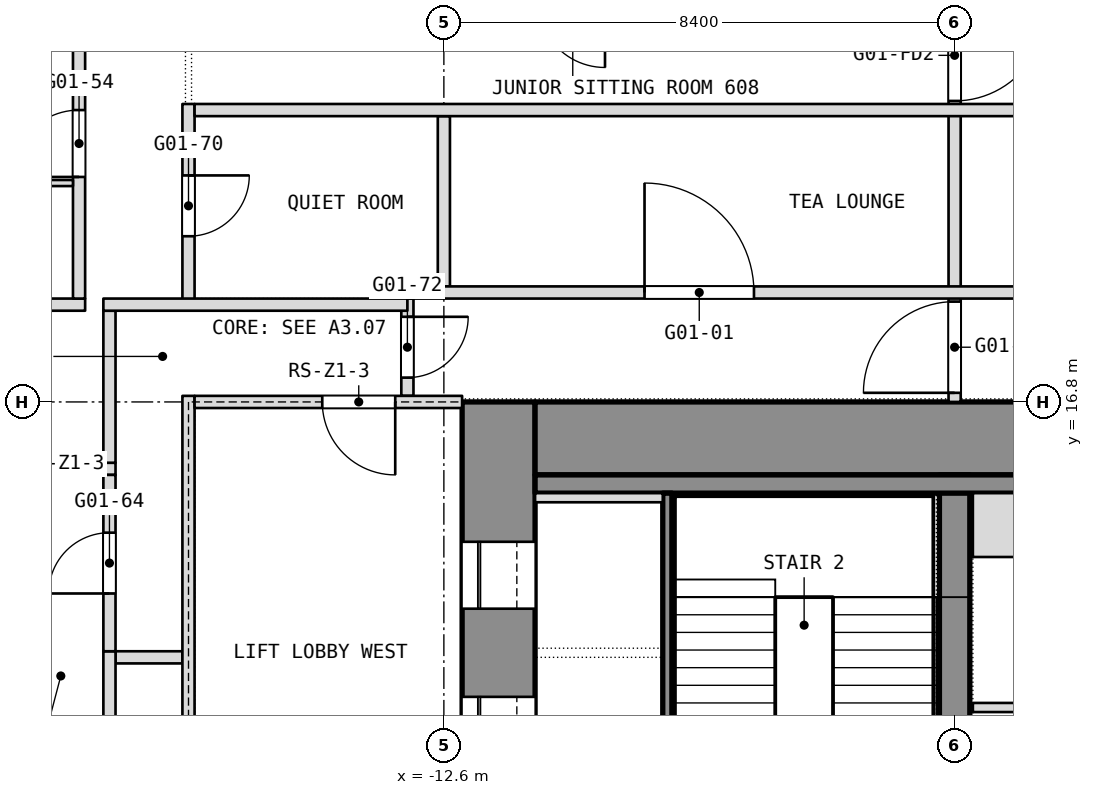
"""IFC4 building model, lengths in metres.
Left out: names, types, materials, properties, quantities, classifications, styles, units other than length and angle.
Written with IfcOpenShell. Run it as: python <this file> out.ifc"""

import sys

from ifc_helpers import new_model, si_unit, direction, frame, frame_2d, origin, place, context, subcontext, project, spatial, rectangle, extrude, element, fill, save


model = new_model("IFC4")
c1 = context("Model", 3, precision=1e-05, world=origin(), true_north=direction((0.0, 1.0)))
c2 = subcontext(c1, "Body", "Model", "MODEL_VIEW")
j1 = project(units=[si_unit("LENGTHUNIT", "METRE"), si_unit("PLANEANGLEUNIT", "RADIAN")], contexts=[c1])
p1 = place(None, origin())
s1 = spatial("IfcSite", under=j1, at=p1, CompositionType="ELEMENT")
p2 = place(p1, origin())
s2 = spatial("IfcBuilding", under=s1, at=p2, CompositionType="ELEMENT")
p3 = place(p2, frame((0.0, 0.0, 36.5)))
s3 = spatial("IfcBuildingStorey", under=s2, at=p3, CompositionType="ELEMENT", Elevation=36.5)
p4 = place(p3, frame((-11.7, 0.0, 0.0), z_axis=(0.0, 0.0, 1.0), x_axis=(0.0, 1.0, 0.0)))
e1 = element("IfcWall", 1, at=p4, inside=s3, PredefinedType="SHEAR", context=c2, shape_type="SweptSolid", body=[
    extrude(rectangle(XDim=16.8, YDim=1.2, at=frame_2d((8.4, 0.0))), origin(), (0.0, 0.0, 1.0), 3.6),
])
p5 = place(p4, frame((2.3, 0.0, 0.0)))
e2 = element("IfcOpeningElement", 2, at=p5, cuts=e1, PredefinedType="OPENING", context=c2, shape_type="SweptSolid", body=[
    extrude(rectangle(XDim=1.1, YDim=2.1, at=frame_2d((0.55, 1.05))), frame((0.0, 0.6, 0.0), z_axis=(0.0, -1.0, 0.0), x_axis=(1.0, 0.0, 0.0)), (0.0, 0.0, 1.0), 1.2),
])
p6 = place(p4, frame((4.85, 0.0, 0.0)))
e3 = element("IfcOpeningElement", 3, at=p6, cuts=e1, PredefinedType="OPENING", context=c2, shape_type="SweptSolid", body=[
    extrude(rectangle(XDim=1.1, YDim=2.1, at=frame_2d((0.55, 1.05))), frame((0.0, 0.6, 0.0), z_axis=(0.0, -1.0, 0.0), x_axis=(1.0, 0.0, 0.0)), (0.0, 0.0, 1.0), 1.2),
])
p7 = place(p4, frame((6.825, 0.0, 0.0)))
e4 = element("IfcOpeningElement", 4, at=p7, cuts=e1, PredefinedType="OPENING", context=c2, shape_type="SweptSolid", body=[
    extrude(rectangle(XDim=1.2, YDim=2.1, at=frame_2d((0.6, 1.05))), frame((0.0, 0.6, 0.0), z_axis=(0.0, -1.0, 0.0), x_axis=(1.0, 0.0, 0.0)), (0.0, 0.0, 1.0), 1.2),
])
p8 = place(p4, frame((13.4, 0.0, 0.0)))
e5 = element("IfcOpeningElement", 5, at=p8, cuts=e1, PredefinedType="OPENING", context=c2, shape_type="SweptSolid", body=[
    extrude(rectangle(XDim=1.1, YDim=2.1, at=frame_2d((0.55, 1.05))), frame((0.0, 0.6, 0.0), z_axis=(0.0, -1.0, 0.0), x_axis=(1.0, 0.0, 0.0)), (0.0, 0.0, 1.0), 1.2),
])
p9 = place(p4, frame((10.85, 0.0, 0.0)))
e6 = element("IfcOpeningElement", 6, at=p9, cuts=e1, PredefinedType="OPENING", context=c2, shape_type="SweptSolid", body=[
    extrude(rectangle(XDim=1.1, YDim=2.1, at=frame_2d((0.55, 1.05))), frame((0.0, 0.6, 0.0), z_axis=(0.0, -1.0, 0.0), x_axis=(1.0, 0.0, 0.0)), (0.0, 0.0, 1.0), 1.2),
])
p10 = place(p4, frame((8.775, 0.0, 0.0)))
e7 = element("IfcOpeningElement", 7, at=p10, cuts=e1, PredefinedType="OPENING", context=c2, shape_type="SweptSolid", body=[
    extrude(rectangle(XDim=1.2, YDim=2.1, at=frame_2d((0.6, 1.05))), frame((0.0, 0.6, 0.0), z_axis=(0.0, -1.0, 0.0), x_axis=(1.0, 0.0, 0.0)), (0.0, 0.0, 1.0), 1.2),
])
p11 = place(p3, frame((-11.1, 16.2, 0.0), z_axis=(0.0, 0.0, 1.0), x_axis=(1.0, 0.0, 0.0)))
e8 = element("IfcWall", 8, at=p11, inside=s3, PredefinedType="SHEAR", context=c2, shape_type="SweptSolid", body=[
    extrude(rectangle(XDim=22.2, YDim=1.2, at=frame_2d((11.1, 0.0))), origin(), (0.0, 0.0, 1.0), 3.6),
])
p12 = place(p3, frame((-4.2, 1.2, 0.0), z_axis=(0.0, 0.0, 1.0), x_axis=(0.0, 1.0, 0.0)))
e9 = element("IfcWall", 9, at=p12, inside=s3, PredefinedType="SHEAR", context=c2, shape_type="SweptSolid", body=[
    extrude(rectangle(XDim=14.4, YDim=0.5, at=frame_2d((7.2, 0.0))), origin(), (0.0, 0.0, 1.0), 3.6),
])
p13 = place(p12, frame((8.1, 0.0, 0.0)))
e10 = element("IfcOpeningElement", 10, at=p13, cuts=e9, PredefinedType="OPENING", context=c2, shape_type="SweptSolid", body=[
    extrude(rectangle(XDim=1.2, YDim=2.1, at=frame_2d((0.6, 1.05))), frame((0.0, 0.25, 0.0), z_axis=(0.0, -1.0, 0.0), x_axis=(1.0, 0.0, 0.0)), (0.0, 0.0, 1.0), 0.5),
])
p14 = place(p3, frame((-4.2, 16.8, 0.0), z_axis=(0.0, 0.0, 1.0), x_axis=(0.0, 1.0, 0.0)))
e11 = element("IfcWall", 11, at=p14, inside=s3, PredefinedType="PARTITIONING", context=c2, shape_type="SweptSolid", body=[
    extrude(rectangle(XDim=6.7, YDim=0.2, at=frame_2d((3.35, 0.0))), origin(), (0.0, 0.0, 1.0), 3.34),
])
p15 = place(p14, frame((0.15, 0.0, 0.0)))
e12 = element("IfcOpeningElement", 12, at=p15, cuts=e11, PredefinedType="OPENING", context=c2, shape_type="SweptSolid", body=[
    extrude(rectangle(XDim=1.5, YDim=2.1, at=frame_2d((0.75, 1.05))), frame((0.0, 0.1, 0.0), z_axis=(0.0, -1.0, 0.0), x_axis=(1.0, 0.0, 0.0)), (0.0, 0.0, 1.0), 0.2),
])
p16 = place(p14, frame((4.95, 0.0, 0.0)))
e13 = element("IfcOpeningElement", 13, at=p16, cuts=e11, PredefinedType="OPENING", context=c2, shape_type="SweptSolid", body=[
    extrude(rectangle(XDim=1.5, YDim=2.1, at=frame_2d((0.75, 1.05))), frame((0.0, 0.1, 0.0), z_axis=(0.0, -1.0, 0.0), x_axis=(1.0, 0.0, 0.0)), (0.0, 0.0, 1.0), 0.2),
])
p17 = place(p3, frame((-12.6, 18.7, 0.0), z_axis=(0.0, 0.0, 1.0), x_axis=(0.0, 1.0, 0.0)))
e14 = element("IfcWall", 14, at=p17, inside=s3, PredefinedType="PARTITIONING", context=c2, shape_type="SweptSolid", body=[
    extrude(rectangle(XDim=2.8, YDim=0.2, at=frame_2d((1.4, 0.0))), origin(), (0.0, 0.0, 1.0), 3.34),
])
p18 = place(p3, frame((-18.0, 12.6, 0.0), z_axis=(0.0, 0.0, 1.0), x_axis=(1.0, 0.0, 0.0)))
e15 = element("IfcWall", 15, at=p18, inside=s3, PredefinedType="PARTITIONING", context=c2, shape_type="SweptSolid", body=[
    extrude(rectangle(XDim=1.1, YDim=0.2, at=frame_2d((0.55, 0.0))), origin(), (0.0, 0.0, 1.0), 3.34),
])
p19 = place(p3, frame((-13.2, 16.9, 0.0), z_axis=(0.0, 0.0, 1.0), x_axis=(0.0, 1.0, 0.0)))
e16 = element("IfcWall", 16, at=p19, inside=s3, PredefinedType="PARTITIONING", context=c2, shape_type="SweptSolid", body=[
    extrude(rectangle(XDim=1.6, YDim=0.2, at=frame_2d((0.8, 0.0))), origin(), (0.0, 0.0, 1.0), 3.34),
])
p20 = place(p19, frame((0.3, 0.0, 0.0)))
e17 = element("IfcOpeningElement", 17, at=p20, cuts=e16, PredefinedType="OPENING", context=c2, shape_type="SweptSolid", body=[
    extrude(rectangle(XDim=1.0, YDim=2.1, at=frame_2d((0.5, 1.05))), frame((0.0, 0.1, 0.0), z_axis=(0.0, -1.0, 0.0), x_axis=(1.0, 0.0, 0.0)), (0.0, 0.0, 1.0), 0.2),
])
p21 = place(p3, frame((-19.7, 15.7, 0.0), z_axis=(0.0, 0.0, 1.0), x_axis=(1.0, 0.0, 0.0)))
e18 = element("IfcWall", 18, at=p21, inside=s3, PredefinedType="PARTITIONING", context=c2, shape_type="SweptSolid", body=[
    extrude(rectangle(XDim=1.7, YDim=0.2, at=frame_2d((0.85, 0.0))), origin(), (0.0, 0.0, 1.0), 3.34),
])
p22 = place(p3, frame((-16.8, 18.35, 0.0), z_axis=(0.0, 0.0, 1.0), x_axis=(0.0, 1.0, 0.0)))
e19 = element("IfcWall", 19, at=p22, inside=s3, PredefinedType="PARTITIONING", context=c2, shape_type="SweptSolid", body=[
    extrude(rectangle(XDim=3.35, YDim=0.2, at=frame_2d((1.675, 0.0))), origin(), (0.0, 0.0, 1.0), 3.34),
])
p23 = place(p22, frame((1.175, 0.0, 0.0)))
e20 = element("IfcOpeningElement", 20, at=p23, cuts=e19, PredefinedType="OPENING", context=c2, shape_type="SweptSolid", body=[
    extrude(rectangle(XDim=1.0, YDim=2.1, at=frame_2d((0.5, 1.05))), frame((0.0, 0.1, 0.0), z_axis=(0.0, -1.0, 0.0), x_axis=(1.0, 0.0, 0.0)), (0.0, 0.0, 1.0), 0.2),
])
p24 = place(p3, frame((-18.1, 9.6, 0.0), z_axis=(0.0, 0.0, 1.0), x_axis=(0.0, 1.0, 0.0)))
e21 = element("IfcWall", 21, at=p24, inside=s3, PredefinedType="PARTITIONING", context=c2, shape_type="SweptSolid", body=[
    extrude(rectangle(XDim=3.1, YDim=0.2, at=frame_2d((1.55, 0.0))), origin(), (0.0, 0.0, 1.0), 3.34),
])
p25 = place(p3, frame((-18.1, 15.8, 0.0), z_axis=(0.0, 0.0, 1.0), x_axis=(0.0, 1.0, 0.0)))
e22 = element("IfcWall", 22, at=p25, inside=s3, PredefinedType="PARTITIONING", context=c2, shape_type="SweptSolid", body=[
    extrude(rectangle(XDim=2.5, YDim=0.2, at=frame_2d((1.25, 0.0))), origin(), (0.0, 0.0, 1.0), 3.34),
])
p26 = place(p3, frame((-18.1, 12.7, 0.0), z_axis=(0.0, 0.0, 1.0), x_axis=(0.0, 1.0, 0.0)))
e23 = element("IfcWall", 23, at=p26, inside=s3, PredefinedType="PARTITIONING", context=c2, shape_type="SweptSolid", body=[
    extrude(rectangle(XDim=2.9, YDim=0.2, at=frame_2d((1.45, 0.0))), origin(), (0.0, 0.0, 1.0), 3.34),
])
p27 = place(p26, frame((0.95, 0.0, 0.0)))
e24 = element("IfcOpeningElement", 24, at=p27, cuts=e23, PredefinedType="OPENING", context=c2, shape_type="SweptSolid", body=[
    extrude(rectangle(XDim=1.0, YDim=2.1, at=frame_2d((0.5, 1.05))), frame((0.0, 0.1, 0.0), z_axis=(0.0, -1.0, 0.0), x_axis=(1.0, 0.0, 0.0)), (0.0, 0.0, 1.0), 0.2),
])
p28 = place(p3, frame((-24.5, 18.4, 0.0), z_axis=(0.0, 0.0, 1.0), x_axis=(1.0, 0.0, 0.0)))
e25 = element("IfcWall", 25, at=p28, inside=s3, PredefinedType="PARTITIONING", context=c2, shape_type="SweptSolid", body=[
    extrude(rectangle(XDim=6.0, YDim=0.2, at=frame_2d((3.0, 0.0))), origin(), (0.0, 0.0, 1.0), 3.34),
])
p29 = place(p3, frame((-18.2, 18.4, 0.0), z_axis=(0.0, 0.0, 1.0), x_axis=(1.0, 0.0, 0.0)))
e26 = element("IfcWall", 26, at=p29, inside=s3, PredefinedType="PARTITIONING", context=c2, shape_type="SweptSolid", body=[
    extrude(rectangle(XDim=5.0, YDim=0.2, at=frame_2d((2.5, 0.0))), origin(), (0.0, 0.0, 1.0), 3.34),
])
p30 = place(p3, frame((-18.6, 18.5, 0.0), z_axis=(0.0, 0.0, 1.0), x_axis=(0.0, 1.0, 0.0)))
e27 = element("IfcWall", 27, at=p30, inside=s3, PredefinedType="PARTITIONING", context=c2, shape_type="SweptSolid", body=[
    extrude(rectangle(XDim=15.04, YDim=0.2, at=frame_2d((7.52, 0.0))), origin(), (0.0, 0.0, 1.0), 3.34),
])
p31 = place(p30, frame((2.0, 0.0, 0.0)))
e28 = element("IfcOpeningElement", 28, at=p31, cuts=e27, PredefinedType="OPENING", context=c2, shape_type="SweptSolid", body=[
    extrude(rectangle(XDim=1.1, YDim=2.1, at=frame_2d((0.55, 1.05))), frame((0.0, 0.1, 0.0), z_axis=(0.0, -1.0, 0.0), x_axis=(1.0, 0.0, 0.0)), (0.0, 0.0, 1.0), 0.2),
])
p32 = place(p30, frame((8.25, 0.0, 0.0)))
e29 = element("IfcOpeningElement", 29, at=p32, cuts=e27, PredefinedType="OPENING", context=c2, shape_type="SweptSolid", body=[
    extrude(rectangle(XDim=1.1, YDim=2.1, at=frame_2d((0.55, 1.05))), frame((0.0, 0.1, 0.0), z_axis=(0.0, -1.0, 0.0), x_axis=(1.0, 0.0, 0.0)), (0.0, 0.0, 1.0), 0.2),
])
p33 = place(p3, frame((-13.2, 18.6, 0.0), z_axis=(0.0, 0.0, 1.0), x_axis=(1.0, 0.0, 0.0)))
e30 = element("IfcWall", 30, at=p33, inside=s3, PredefinedType="PARTITIONING", context=c2, shape_type="SweptSolid", body=[
    extrude(rectangle(XDim=19.8, YDim=0.2, at=frame_2d((9.9, 0.0))), origin(), (0.0, 0.0, 1.0), 3.34),
])
p34 = place(p33, frame((3.9, 0.0, 0.0)))
e31 = element("IfcOpeningElement", 31, at=p34, cuts=e30, PredefinedType="OPENING", context=c2, shape_type="SweptSolid", body=[
    extrude(rectangle(XDim=1.8, YDim=2.1, at=frame_2d((0.9, 1.05))), frame((0.0, 0.1, 0.0), z_axis=(0.0, -1.0, 0.0), x_axis=(1.0, 0.0, 0.0)), (0.0, 0.0, 1.0), 0.2),
])
p35 = place(p33, frame((12.3, 0.0, 0.0)))
e32 = element("IfcOpeningElement", 32, at=p35, cuts=e30, PredefinedType="OPENING", context=c2, shape_type="SweptSolid", body=[
    extrude(rectangle(XDim=1.8, YDim=2.1, at=frame_2d((0.9, 1.05))), frame((0.0, 0.1, 0.0), z_axis=(0.0, -1.0, 0.0), x_axis=(1.0, 0.0, 0.0)), (0.0, 0.0, 1.0), 0.2),
])
p36 = place(p33, frame((18.05, 0.0, 0.0)))
e33 = element("IfcOpeningElement", 33, at=p36, cuts=e30, PredefinedType="OPENING", context=c2, shape_type="SweptSolid", body=[
    extrude(rectangle(XDim=1.0, YDim=2.1, at=frame_2d((0.5, 1.05))), frame((0.0, 0.1, 0.0), z_axis=(0.0, -1.0, 0.0), x_axis=(1.0, 0.0, 0.0)), (0.0, 0.0, 1.0), 0.2),
])
p37 = place(p3, frame((-23.15, 20.4, 0.0), z_axis=(0.0, 0.0, 1.0), x_axis=(1.0, 0.0, 0.0)))
e34 = element("IfcWall", 34, at=p37, inside=s3, PredefinedType="PARTITIONING", context=c2, shape_type="SweptSolid", body=[
    extrude(rectangle(XDim=4.45, YDim=0.1, at=frame_2d((2.225, 0.0))), origin(), (0.0, 0.0, 1.0), 3.34),
])
p38 = place(p3, frame((-16.7, 21.6, 0.0), z_axis=(0.0, 0.0, 1.0), x_axis=(1.0, 0.0, 0.0)))
e35 = element("IfcWall", 35, at=p38, inside=s3, PredefinedType="PARTITIONING", context=c2, shape_type="SweptSolid", body=[
    extrude(rectangle(XDim=23.3, YDim=0.2, at=frame_2d((11.65, 0.0))), origin(), (0.0, 0.0, 1.0), 3.34),
])
p39 = place(p3, frame((-11.1, 15.45, 0.0), z_axis=(0.0, 0.0, 1.0), x_axis=(1.0, 0.0, 0.0)))
e36 = element("IfcWall", 36, at=p39, inside=s3, PredefinedType="PARTITIONING", context=c2, shape_type="SweptSolid", body=[
    extrude(rectangle(XDim=22.2, YDim=0.3, at=frame_2d((11.1, 0.0))), origin(), (0.0, 0.0, 1.0), 3.34),
])
p40 = place(p3, frame((-8.925, 8.7, 0.0), z_axis=(0.0, 0.0, 1.0), x_axis=(0.0, 1.0, 0.0)))
e37 = element("IfcWall", 37, at=p40, inside=s3, PredefinedType="SHEAR", context=c2, shape_type="SweptSolid", body=[
    extrude(rectangle(XDim=6.6, YDim=0.15, at=frame_2d((3.3, 0.0))), origin(), (0.0, 0.0, 1.0), 3.34),
])
p41 = place(p40, frame((0.075, 0.0, 0.0)))
e38 = element("IfcOpeningElement", 38, at=p41, cuts=e37, PredefinedType="OPENING", context=c2, shape_type="SweptSolid", body=[
    extrude(rectangle(XDim=1.2, YDim=2.1, at=frame_2d((0.6, 1.05))), frame((0.0, 0.075, 0.0), z_axis=(0.0, -1.0, 0.0), x_axis=(1.0, 0.0, 0.0)), (0.0, 0.0, 1.0), 0.15),
])
p42 = place(p3, frame((-11.1, 15.225, 0.0), z_axis=(0.0, 0.0, 1.0), x_axis=(1.0, 0.0, 0.0)))
e39 = element("IfcWall", 39, at=p42, inside=s3, PredefinedType="SHEAR", context=c2, shape_type="SweptSolid", body=[
    extrude(rectangle(XDim=2.1, YDim=0.15, at=frame_2d((1.05, 0.0))), origin(), (0.0, 0.0, 1.0), 3.6),
])
p43 = place(p3, frame((-3.9, 11.775, 0.0), z_axis=(0.0, 0.0, 1.0), x_axis=(1.0, 0.0, 0.0)))
e40 = element("IfcWall", 40, at=p43, inside=s3, PredefinedType="PARTITIONING", context=c2, shape_type="SweptSolid", body=[
    extrude(rectangle(XDim=7.8, YDim=0.15, at=frame_2d((3.9, 0.0))), origin(), (0.0, 0.0, 1.0), 3.34),
])
p44 = place(p43, frame((3.3, 0.0, 0.0)))
e41 = element("IfcOpeningElement", 41, at=p44, cuts=e40, PredefinedType="OPENING", context=c2, shape_type="SweptSolid", body=[
    extrude(rectangle(XDim=1.2, YDim=2.1, at=frame_2d((0.6, 1.05))), frame((0.0, 0.075, 0.0), z_axis=(0.0, -1.0, 0.0), x_axis=(1.0, 0.0, 0.0)), (0.0, 0.0, 1.0), 0.15),
])
p45 = place(p3, frame((-3.9, 14.775, 0.0), z_axis=(0.0, 0.0, 1.0), x_axis=(1.0, 0.0, 0.0)))
e42 = element("IfcWall", 42, at=p45, inside=s3, PredefinedType="PARTITIONING", context=c2, shape_type="SweptSolid", body=[
    extrude(rectangle(XDim=2.25, YDim=1.05, at=frame_2d((1.125, 0.0))), origin(), (0.0, 0.0, 1.0), 3.34),
])
p46 = place(p3, frame((-16.8, -0.1, 0.0), z_axis=(0.0, 0.0, 1.0), x_axis=(0.0, 1.0, 0.0)))
e43 = element("IfcWall", 43, at=p46, inside=s3, PredefinedType="PARTITIONING", context=c2, shape_type="SweptSolid", body=[
    extrude(rectangle(XDim=17.0, YDim=0.2, at=frame_2d((8.5, 0.0))), origin(), (0.0, 0.0, 1.0), 3.34),
])
p47 = place(p46, frame((2.2, 0.0, 0.0)))
e44 = element("IfcOpeningElement", 44, at=p47, cuts=e43, PredefinedType="OPENING", context=c2, shape_type="SweptSolid", body=[
    extrude(rectangle(XDim=1.8, YDim=2.1, at=frame_2d((0.9, 1.05))), frame((0.0, 0.1, 0.0), z_axis=(0.0, -1.0, 0.0), x_axis=(1.0, 0.0, 0.0)), (0.0, 0.0, 1.0), 0.2),
])
p48 = place(p46, frame((7.2, 0.0, 0.0)))
e45 = element("IfcOpeningElement", 45, at=p48, cuts=e43, PredefinedType="OPENING", context=c2, shape_type="SweptSolid", body=[
    extrude(rectangle(XDim=1.8, YDim=2.1, at=frame_2d((0.9, 1.05))), frame((0.0, 0.1, 0.0), z_axis=(0.0, -1.0, 0.0), x_axis=(1.0, 0.0, 0.0)), (0.0, 0.0, 1.0), 0.2),
])
p49 = place(p3, frame((-16.7, 16.8, 0.0), z_axis=(0.0, 0.0, 1.0), x_axis=(1.0, 0.0, 0.0)))
e46 = element("IfcWall", 46, at=p49, inside=s3, PredefinedType="PARTITIONING", context=c2, shape_type="SweptSolid", body=[
    extrude(rectangle(XDim=4.4, YDim=0.2, at=frame_2d((2.2, 0.0))), origin(), (0.0, 0.0, 1.0), 2.84),
])
p50 = place(p49, frame((2.1, 0.0, 0.0)))
e47 = element("IfcOpeningElement", 47, at=p50, cuts=e46, PredefinedType="OPENING", context=c2, shape_type="SweptSolid", body=[
    extrude(rectangle(XDim=1.2, YDim=2.1, at=frame_2d((0.6, 1.05))), frame((0.0, 0.1, 0.0), z_axis=(0.0, -1.0, 0.0), x_axis=(1.0, 0.0, 0.0)), (0.0, 0.0, 1.0), 0.2),
])
p51 = place(p20, origin())
e48 = element("IfcDoor", 48, at=p51, inside=s3, OperationType="SINGLE_SWING_RIGHT", PredefinedType="DOOR", context=c2, shape_type="SweptSolid", body=[
    extrude(rectangle(XDim=1.0, YDim=2.1, at=frame_2d((0.5, 1.05))), frame((0.0, 0.025, 0.0), z_axis=(0.0, -1.0, 0.0), x_axis=(1.0, 0.0, 0.0)), (0.0, 0.0, 1.0), 0.05),
])
fill(e17, e48)
p52 = place(p23, origin())
e49 = element("IfcDoor", 49, at=p52, inside=s3, OperationType="SINGLE_SWING_LEFT", PredefinedType="DOOR", context=c2, shape_type="SweptSolid", body=[
    extrude(rectangle(XDim=1.0, YDim=2.1, at=frame_2d((0.5, 1.05))), frame((0.0, 0.025, 0.0), z_axis=(0.0, -1.0, 0.0), x_axis=(1.0, 0.0, 0.0)), (0.0, 0.0, 1.0), 0.05),
])
fill(e20, e49)
p53 = place(p27, origin())
e50 = element("IfcDoor", 50, at=p53, inside=s3, OperationType="SINGLE_SWING_RIGHT", PredefinedType="DOOR", context=c2, shape_type="SweptSolid", body=[
    extrude(rectangle(XDim=1.0, YDim=2.1, at=frame_2d((0.5, 1.05))), frame((0.0, 0.025, 0.0), z_axis=(0.0, -1.0, 0.0), x_axis=(1.0, 0.0, 0.0)), (0.0, 0.0, 1.0), 0.05),
])
fill(e24, e50)
p54 = place(p31, origin())
e51 = element("IfcDoor", 51, at=p54, inside=s3, OperationType="SINGLE_SWING_LEFT", PredefinedType="DOOR", context=c2, shape_type="SweptSolid", body=[
    extrude(rectangle(XDim=1.1, YDim=2.1, at=frame_2d((0.55, 1.05))), frame((0.0, 0.025, 0.0), z_axis=(0.0, -1.0, 0.0), x_axis=(1.0, 0.0, 0.0)), (0.0, 0.0, 1.0), 0.05),
])
fill(e28, e51)
p55 = place(p34, origin())
e52 = element("IfcDoor", 52, at=p55, inside=s3, OperationType="DOUBLE_DOOR_SINGLE_SWING", PredefinedType="DOOR", context=c2, shape_type="SweptSolid", body=[
    extrude(rectangle(XDim=1.8, YDim=2.1, at=frame_2d((0.9, 1.05))), frame((0.0, 0.025, 0.0), z_axis=(0.0, -1.0, 0.0), x_axis=(1.0, 0.0, 0.0)), (0.0, 0.0, 1.0), 0.05),
])
fill(e31, e52)
p56 = place(p8, origin())
e53 = element("IfcDoor", 53, at=p56, inside=s3, OperationType="SLIDING_TO_LEFT", PredefinedType="DOOR", context=c2, shape_type="SweptSolid", body=[
    extrude(rectangle(XDim=1.1, YDim=2.1, at=frame_2d((0.55, 1.05))), frame((0.0, 0.025, 0.0), z_axis=(0.0, -1.0, 0.0), x_axis=(1.0, 0.0, 0.0)), (0.0, 0.0, 1.0), 0.05),
])
fill(e5, e53)
p57 = place(p9, origin())
e54 = element("IfcDoor", 54, at=p57, inside=s3, OperationType="SLIDING_TO_LEFT", PredefinedType="DOOR", context=c2, shape_type="SweptSolid", body=[
    extrude(rectangle(XDim=1.1, YDim=2.1, at=frame_2d((0.55, 1.05))), frame((0.0, 0.025, 0.0), z_axis=(0.0, -1.0, 0.0), x_axis=(1.0, 0.0, 0.0)), (0.0, 0.0, 1.0), 0.05),
])
fill(e6, e54)
p58 = place(p50, origin())
e55 = element("IfcDoor", 55, at=p58, inside=s3, OperationType="SINGLE_SWING_LEFT", PredefinedType="DOOR", context=c2, shape_type="SweptSolid", body=[
    extrude(rectangle(XDim=1.2, YDim=2.1, at=frame_2d((0.6, 1.05))), frame((0.0, 0.025, 0.0), z_axis=(0.0, -1.0, 0.0), x_axis=(1.0, 0.0, 0.0)), (0.0, 0.0, 1.0), 0.05),
])
fill(e47, e55)
p59 = place(p15, origin())
e56 = element("IfcDoor", 56, at=p59, inside=s3, OperationType="DOUBLE_DOOR_DOUBLE_SWING", PredefinedType="DOOR", context=c2, shape_type="SweptSolid", body=[
    extrude(rectangle(XDim=1.5, YDim=2.1, at=frame_2d((0.75, 1.05))), frame((0.0, 0.025, 0.0), z_axis=(0.0, -1.0, 0.0), x_axis=(1.0, 0.0, 0.0)), (0.0, 0.0, 1.0), 0.05),
])
fill(e12, e56)
p60 = place(p16, origin())
e57 = element("IfcDoor", 57, at=p60, inside=s3, OperationType="DOUBLE_DOOR_DOUBLE_SWING", PredefinedType="DOOR", context=c2, shape_type="SweptSolid", body=[
    extrude(rectangle(XDim=1.5, YDim=2.1, at=frame_2d((0.75, 1.05))), frame((0.0, 0.025, 0.0), z_axis=(0.0, -1.0, 0.0), x_axis=(1.0, 0.0, 0.0)), (0.0, 0.0, 1.0), 0.05),
])
fill(e13, e57)
save(model, sys.argv[1])
